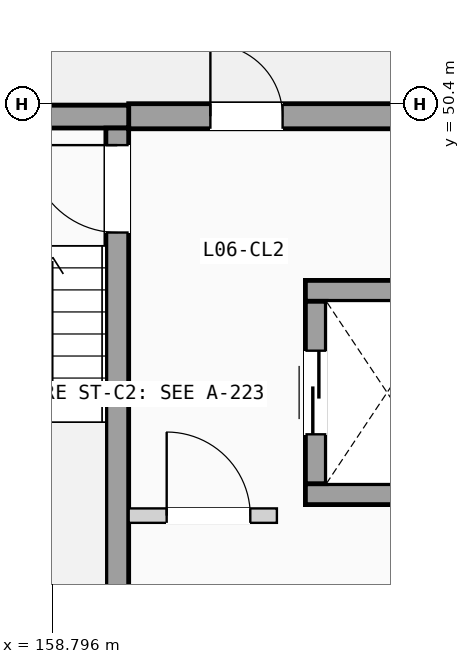
"""IFC4 building model, lengths in metres.
Left out: names, types, materials, properties, quantities, classifications, styles, units other than length and angle.
Written with IfcOpenShell. Run it as: python <this file> out.ifc"""

import sys

from ifc_helpers import new_model, si_unit, direction, frame, frame_2d, origin, place, context, subcontext, project, spatial, rectangle, extrude, element, fill, save


model = new_model("IFC4")
c1 = context("Model", 3, precision=1e-05, world=origin(), true_north=direction((0.0, 1.0)))
c2 = subcontext(c1, "Body", "Model", "MODEL_VIEW")
j1 = project(units=[si_unit("LENGTHUNIT", "METRE"), si_unit("PLANEANGLEUNIT", "RADIAN")], contexts=[c1])
p1 = place(None, origin())
s1 = spatial("IfcSite", under=j1, at=p1, CompositionType="ELEMENT")
p2 = place(p1, origin())
s2 = spatial("IfcBuilding", under=s1, at=p2, CompositionType="ELEMENT")
p3 = place(p2, frame((0.0, 0.0, 21.525)))
s3 = spatial("IfcBuildingStorey", under=s2, at=p3, CompositionType="ELEMENT", Elevation=21.525)
p4 = place(p3, frame((159.8, 50.235, 0.0), z_axis=(0.0, 0.0, 1.0), x_axis=(1.0, 0.0, 0.0)))
e1 = element("IfcWall", 1, at=p4, inside=s3, PredefinedType="SOLIDWALL", context=c2, shape_type="SweptSolid", body=[
    extrude(rectangle(XDim=4.15, YDim=0.33, at=frame_2d((2.075, 0.0))), origin(), (0.0, 0.0, 1.0), 2.89),
])
p5 = place(p4, frame((1.075, 0.0, 0.0)))
e2 = element("IfcOpeningElement", 2, at=p5, cuts=e1, PredefinedType="OPENING", context=c2, shape_type="SweptSolid", body=[
    extrude(rectangle(XDim=0.95, YDim=2.15, at=frame_2d((0.475, 1.075))), frame((0.0, 0.175, 0.0), z_axis=(0.0, -1.0, 0.0), x_axis=(1.0, 0.0, 0.0)), (0.0, 0.0, 1.0), 0.35),
])
p6 = place(p3, frame((156.2, 50.23, 0.0), z_axis=(0.0, 0.0, 1.0), x_axis=(1.0, 0.0, 0.0)))
e3 = element("IfcWall", 3, at=p6, inside=s3, PredefinedType="SHEAR", context=c2, shape_type="SweptSolid", body=[
    extrude(rectangle(XDim=3.6, YDim=0.3, at=frame_2d((1.8, 0.0))), origin(), (0.0, 0.0, 1.0), 2.89),
])
p7 = place(p3, frame((159.65, 43.08, 0.0), z_axis=(0.0, 0.0, 1.0), x_axis=(0.0, 1.0, 0.0)))
e4 = element("IfcWall", 4, at=p7, inside=s3, PredefinedType="SHEAR", context=c2, shape_type="SweptSolid", body=[
    extrude(rectangle(XDim=7.0, YDim=0.3, at=frame_2d((3.5, 0.0))), origin(), (0.0, 0.0, 1.0), 2.89),
])
p8 = place(p7, frame((5.625, 0.0, 0.0)))
e5 = element("IfcOpeningElement", 5, at=p8, cuts=e4, PredefinedType="OPENING", context=c2, shape_type="SweptSolid", body=[
    extrude(rectangle(XDim=1.15, YDim=2.12, at=frame_2d((0.575, 1.06))), frame((0.0, 0.16, 0.0), z_axis=(0.0, -1.0, 0.0), x_axis=(1.0, 0.0, 0.0)), (0.0, 0.0, 1.0), 0.32),
])
for number, where, z_axis, x_axis in (
    (6, (162.125, 45.262, 0.0), (0.0, 0.0, 1.0), (1.0, 0.0, 0.0)),
    (7, (162.125, 47.938, 0.0), (0.0, 0.0, 1.0), (1.0, 0.0, 0.0)),
):
    element("IfcWall", number, at=place(p3, frame(where, z_axis=z_axis, x_axis=x_axis)), inside=s3, PredefinedType="SHEAR", context=c2, shape_type="SweptSolid", body=[
        extrude(rectangle(XDim=2.15, YDim=0.275, at=frame_2d((1.075, 0.0))), origin(), (0.0, 0.0, 1.0), 2.89),
    ])
p9 = place(p3, frame((162.262, 45.4, 0.0), z_axis=(0.0, 0.0, 1.0), x_axis=(0.0, 1.0, 0.0)))
e8 = element("IfcWall", 8, at=p9, inside=s3, PredefinedType="SHEAR", context=c2, shape_type="SweptSolid", body=[
    extrude(rectangle(XDim=2.4, YDim=0.275, at=frame_2d((1.2, 0.0))), origin(), (0.0, 0.0, 1.0), 2.89),
])
p10 = place(p9, frame((0.65, 0.0, 0.0)))
e9 = element("IfcOpeningElement", 9, at=p10, cuts=e8, PredefinedType="OPENING", context=c2, shape_type="SweptSolid", body=[
    extrude(rectangle(XDim=1.1, YDim=2.15, at=frame_2d((0.55, 1.075))), frame((0.0, 0.147, 0.0), z_axis=(0.0, -1.0, 0.0), x_axis=(1.0, 0.0, 0.0)), (0.0, 0.0, 1.0), 0.295),
])
p11 = place(p3, frame((159.8, 44.98, 0.0), z_axis=(0.0, 0.0, 1.0), x_axis=(1.0, 0.0, 0.0)))
e10 = element("IfcWall", 10, at=p11, inside=s3, PredefinedType="PARTITIONING", context=c2, shape_type="SweptSolid", body=[
    extrude(rectangle(XDim=1.95, YDim=0.19, at=frame_2d((0.975, 0.0))), origin(), (0.0, 0.0, 1.0), 2.87),
])
p12 = place(p11, frame((0.5, 0.0, 0.0)))
e11 = element("IfcOpeningElement", 11, at=p12, cuts=e10, PredefinedType="OPENING", context=c2, shape_type="SweptSolid", body=[
    extrude(rectangle(XDim=1.1, YDim=2.12, at=frame_2d((0.55, 1.06))), frame((0.0, 0.105, 0.0), z_axis=(0.0, -1.0, 0.0), x_axis=(1.0, 0.0, 0.0)), (0.0, 0.0, 1.0), 0.21),
])
p13 = place(p5, origin())
e12 = element("IfcDoor", 12, at=p13, inside=s3, OperationType="SINGLE_SWING_LEFT", PredefinedType="DOOR", context=c2, shape_type="SweptSolid", body=[
    extrude(rectangle(XDim=0.95, YDim=2.15, at=frame_2d((0.475, 1.075))), frame((0.0, 0.025, 0.0), z_axis=(0.0, -1.0, 0.0), x_axis=(1.0, 0.0, 0.0)), (0.0, 0.0, 1.0), 0.05),
])
fill(e2, e12)
p14 = place(p8, origin())
e13 = element("IfcDoor", 13, at=p14, inside=s3, OperationType="SINGLE_SWING_RIGHT", PredefinedType="DOOR", context=c2, shape_type="SweptSolid", body=[
    extrude(rectangle(XDim=1.15, YDim=2.12, at=frame_2d((0.575, 1.06))), frame((0.0, 0.025, 0.0), z_axis=(0.0, -1.0, 0.0), x_axis=(1.0, 0.0, 0.0)), (0.0, 0.0, 1.0), 0.05),
])
fill(e5, e13)
p15 = place(p10, origin())
e14 = element("IfcDoor", 14, at=p15, inside=s3, OperationType="SLIDING_TO_LEFT", PredefinedType="DOOR", context=c2, shape_type="SweptSolid", body=[
    extrude(rectangle(XDim=1.1, YDim=2.15, at=frame_2d((0.55, 1.075))), frame((0.0, 0.025, 0.0), z_axis=(0.0, -1.0, 0.0), x_axis=(1.0, 0.0, 0.0)), (0.0, 0.0, 1.0), 0.05),
])
fill(e9, e14)
p16 = place(p12, origin())
e15 = element("IfcDoor", 15, at=p16, inside=s3, OperationType="SINGLE_SWING_LEFT", PredefinedType="DOOR", context=c2, shape_type="SweptSolid", body=[
    extrude(rectangle(XDim=1.1, YDim=2.12, at=frame_2d((0.55, 1.06))), frame((0.0, 0.025, 0.0), z_axis=(0.0, -1.0, 0.0), x_axis=(1.0, 0.0, 0.0)), (0.0, 0.0, 1.0), 0.05),
])
fill(e11, e15)
save(model, sys.argv[1])
